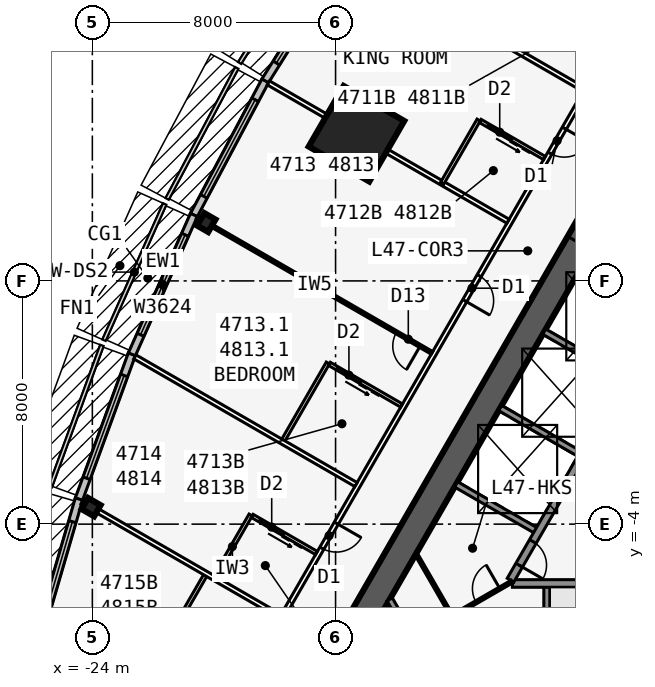
"""IFC4 building model, lengths in metres.
Left out: names, types, materials, properties, quantities, classifications, styles, units other than length and angle.
Written with IfcOpenShell. Run it as: python <this file> out.ifc"""

import sys

from ifc_helpers import new_model, si_unit, direction, frame, frame_2d, origin, origin_2d, place, context, subcontext, project, spatial, rectangle, i_section, extrude, element, fill, save


model = new_model("IFC4")
c1 = context("Model", 3, precision=1e-05, world=origin(), true_north=direction((0.0, 1.0)))
c2 = subcontext(c1, "Body", "Model", "MODEL_VIEW")
j1 = project(units=[si_unit("LENGTHUNIT", "METRE"), si_unit("PLANEANGLEUNIT", "RADIAN")], contexts=[c1])
p1 = place(None, origin())
s1 = spatial("IfcSite", under=j1, at=p1, CompositionType="ELEMENT")
p2 = place(p1, origin())
s2 = spatial("IfcBuilding", under=s1, at=p2, CompositionType="ELEMENT")
p3 = place(p2, frame((0.0, 0.0, 175.9)))
s3 = spatial("IfcBuildingStorey", under=s2, at=p3, CompositionType="ELEMENT", Elevation=175.9)
p4 = place(p3, frame((-10.183, -5.951, 0.0), z_axis=(0.0, 0.0, 1.0), x_axis=(1.0, 0.0, 0.0)))
e1 = element("IfcWall", 1, at=p4, inside=s3, PredefinedType="SOLIDWALL", context=c2, shape_type="SweptSolid", body=[
    extrude(rectangle(XDim=7.633, YDim=0.25, at=frame_2d((3.816, 0.0))), origin(), (0.0, 0.0, 1.0), 3.235),
])
p5 = place(p3, frame((-9.05, -5.951, 0.0), z_axis=(0.0, 0.0, 1.0), x_axis=(0.0, -1.0, 0.0)))
e2 = element("IfcWall", 2, at=p5, inside=s3, PredefinedType="SOLIDWALL", context=c2, shape_type="SweptSolid", body=[
    extrude(rectangle(XDim=3.125, YDim=0.2, at=frame_2d((1.562, 0.0))), origin(), (0.0, 0.0, 1.0), 3.235),
])
p6 = place(p3, frame((0.0, 19.052, 0.0), z_axis=(0.0, 0.0, 1.0), x_axis=(-0.499999749417, -0.866025548458, 0.0)))
e3 = element("IfcWall", 3, at=p6, inside=s3, PredefinedType="SHEAR", context=c2, shape_type="SweptSolid", body=[
    extrude(rectangle(XDim=33.0, YDim=0.9, at=frame_2d((16.5, 0.0))), origin(), (0.0, 0.0, 1.0), 3.4),
])
p7 = place(p6, frame((14.15, 0.0, 0.0)))
e4 = element("IfcOpeningElement", 4, at=p7, cuts=e3, PredefinedType="OPENING", context=c2, shape_type="SweptSolid", body=[
    extrude(rectangle(XDim=1.8, YDim=2.13, at=frame_2d((0.9, 1.065))), frame((0.0, 0.46, 0.0), z_axis=(0.0, -1.0, 0.0), x_axis=(1.0, 0.0, 0.0)), (0.0, 0.0, 1.0), 0.92),
])
p8 = place(p6, frame((12.6, 0.0, 0.0)))
e5 = element("IfcOpeningElement", 5, at=p8, cuts=e3, PredefinedType="OPENING", context=c2, shape_type="SweptSolid", body=[
    extrude(rectangle(XDim=1.0, YDim=2.13, at=frame_2d((0.5, 1.065))), frame((0.0, 0.46, 0.0), z_axis=(0.0, -1.0, 0.0), x_axis=(1.0, 0.0, 0.0)), (0.0, 0.0, 1.0), 0.92),
])
p9 = place(p3, frame((-4.929, 3.365, 0.0), z_axis=(0.0, 0.0, 1.0), x_axis=(-0.499991433582, -0.866030349552, 0.0)))
e6 = element("IfcWall", 6, at=p9, inside=s3, PredefinedType="SOLIDWALL", context=c2, shape_type="SweptSolid", body=[
    extrude(rectangle(XDim=10.633, YDim=0.25, at=frame_2d((5.316, 0.0))), origin(), (0.0, 0.0, 1.0), 3.235),
])
p10 = place(p9, frame((9.164, 0.0, 0.0)))
e7 = element("IfcOpeningElement", 7, at=p10, cuts=e6, PredefinedType="OPENING", context=c2, shape_type="SweptSolid", body=[
    extrude(rectangle(XDim=0.9, YDim=2.13, at=frame_2d((0.45, 1.065))), frame((0.0, 0.135, 0.0), z_axis=(0.0, -1.0, 0.0), x_axis=(1.0, 0.0, 0.0)), (0.0, 0.0, 1.0), 0.27),
])
for number, where, z_axis, x_axis in (
    (8, (-6.429, 0.767, 0.0), (0.0, 0.0, 1.0), (-0.866, 0.5, 0.0)),
    (9, (-7.879, -1.744, 0.0), (0.0, 0.0, 1.0), (-0.866, 0.5, 0.0)),
    (10, (-9.329, -4.256, 0.0), (0.0, 0.0, 1.0), (-0.866, 0.5, 0.0)),
):
    element("IfcWall", number, at=place(p3, frame(where, z_axis=z_axis, x_axis=x_axis)), inside=s3, PredefinedType="SOLIDWALL", context=c2, shape_type="SweptSolid", body=[
        extrude(rectangle(XDim=3.125, YDim=0.2, at=frame_2d((1.562, 0.0))), origin(), (0.0, 0.0, 1.0), 3.235),
    ])
for number, where, z_axis, x_axis in (
    (11, (-20.254, 5.92, 0.0), (0.0, 0.0, 1.0), (-0.866, 0.5, 0.0)),
    (12, (-24.041, -3.44, 0.0), (0.0, 0.0, 1.0), (-0.5, -0.866, 0.0)),
):
    element("IfcColumn", number, at=place(p3, frame(where, z_axis=z_axis, x_axis=x_axis)), inside=s3, PredefinedType="COLUMN", context=c2, shape_type="SweptSolid", body=[
        extrude(i_section(OverallWidth=0.424, OverallDepth=0.475, WebThickness=0.048, FlangeThickness=0.077, at=origin_2d()), origin(), (0.0, 0.0, 1.0), 3.4),
    ])
p11 = place(p3, frame((-15.312, 8.84, 0.0), z_axis=(0.0, 0.0, 1.0), x_axis=(-0.866025403784, 0.5, 0.0)))
e13 = element("IfcColumn", 13, at=p11, inside=s3, PredefinedType="COLUMN", context=c2, shape_type="SweptSolid", body=[
    extrude(rectangle(XDim=2.3, YDim=2.3, at=origin_2d()), origin(), (0.0, 0.0, 1.0), 3.4),
])
p12 = place(p3, frame((-15.667, 14.814, 0.0), z_axis=(0.0, 0.0, 1.0), x_axis=(-0.529990167382, -0.84800378683, 0.0)))
e14 = element("IfcWall", 14, at=p12, inside=s3, PredefinedType="STANDARD", context=c2, shape_type="SweptSolid", body=[
    extrude(rectangle(XDim=5.003, YDim=0.25, at=frame_2d((2.501, 0.0))), origin(), (0.0, 0.0, 1.0), 3.235),
])
p13 = place(p12, frame((0.701, 0.0, 0.45)))
e15 = element("IfcOpeningElement", 15, at=p13, cuts=e14, PredefinedType="OPENING", context=c2, shape_type="SweptSolid", body=[
    extrude(rectangle(XDim=3.6, YDim=2.4, at=frame_2d((1.8, 1.2))), frame((0.0, 0.135, 0.0), z_axis=(0.0, -1.0, 0.0), x_axis=(1.0, 0.0, 0.0)), (0.0, 0.0, 1.0), 0.27),
])
p14 = place(p3, frame((-18.314, 10.579, 0.0), z_axis=(0.0, 0.0, 1.0), x_axis=(-0.469404966864, -0.882982999317, 0.0)))
e16 = element("IfcWall", 16, at=p14, inside=s3, PredefinedType="STANDARD", context=c2, shape_type="SweptSolid", body=[
    extrude(rectangle(XDim=5.003, YDim=0.25, at=frame_2d((2.501, 0.0))), origin(), (0.0, 0.0, 1.0), 3.235),
])
p15 = place(p14, frame((0.701, 0.0, 0.45)))
e17 = element("IfcOpeningElement", 17, at=p15, cuts=e16, PredefinedType="OPENING", context=c2, shape_type="SweptSolid", body=[
    extrude(rectangle(XDim=3.6, YDim=2.4, at=frame_2d((1.8, 1.2))), frame((0.0, 0.135, 0.0), z_axis=(0.0, -1.0, 0.0), x_axis=(1.0, 0.0, 0.0)), (0.0, 0.0, 1.0), 0.27),
])
p16 = place(p3, frame((-20.659, 6.169, 0.0), z_axis=(0.0, 0.0, 1.0), x_axis=(-0.406832200364, -0.913502906808, 0.0)))
e18 = element("IfcWall", 18, at=p16, inside=s3, PredefinedType="STANDARD", context=c2, shape_type="SweptSolid", body=[
    extrude(rectangle(XDim=5.028, YDim=0.25, at=frame_2d((2.514, 0.0))), origin(), (0.0, 0.0, 1.0), 3.235),
])
p17 = place(p16, frame((0.714, 0.0, 0.45)))
e19 = element("IfcOpeningElement", 19, at=p17, cuts=e18, PredefinedType="OPENING", context=c2, shape_type="SweptSolid", body=[
    extrude(rectangle(XDim=3.6, YDim=2.4, at=frame_2d((1.8, 1.2))), frame((0.0, 0.135, 0.0), z_axis=(0.0, -1.0, 0.0), x_axis=(1.0, 0.0, 0.0)), (0.0, 0.0, 1.0), 0.27),
])
p18 = place(p3, frame((-22.701, 1.584, 0.0), z_axis=(0.0, 0.0, 1.0), x_axis=(-0.343225593282, -0.939252996863, 0.0)))
e20 = element("IfcWall", 20, at=p18, inside=s3, PredefinedType="STANDARD", context=c2, shape_type="SweptSolid", body=[
    extrude(rectangle(XDim=5.076, YDim=0.25, at=frame_2d((2.538, 0.0))), origin(), (0.0, 0.0, 1.0), 3.235),
])
p19 = place(p18, frame((0.738, 0.0, 0.45)))
e21 = element("IfcOpeningElement", 21, at=p19, cuts=e20, PredefinedType="OPENING", context=c2, shape_type="SweptSolid", body=[
    extrude(rectangle(XDim=3.6, YDim=2.4, at=frame_2d((1.8, 1.2))), frame((0.0, 0.135, 0.0), z_axis=(0.0, -1.0, 0.0), x_axis=(1.0, 0.0, 0.0)), (0.0, 0.0, 1.0), 0.27),
])
p20 = place(p3, frame((-24.441, -3.175, 0.0), z_axis=(0.0, 0.0, 1.0), x_axis=(-0.279528287117, -0.960137457191, 0.0)))
e22 = element("IfcWall", 22, at=p20, inside=s3, PredefinedType="STANDARD", context=c2, shape_type="SweptSolid", body=[
    extrude(rectangle(XDim=5.148, YDim=0.25, at=frame_2d((2.574, 0.0))), origin(), (0.0, 0.0, 1.0), 3.235),
])
p21 = place(p20, frame((0.774, 0.0, 0.45)))
e23 = element("IfcOpeningElement", 23, at=p21, cuts=e22, PredefinedType="OPENING", context=c2, shape_type="SweptSolid", body=[
    extrude(rectangle(XDim=3.6, YDim=2.4, at=frame_2d((1.8, 1.2))), frame((0.0, 0.135, 0.0), z_axis=(0.0, -1.0, 0.0), x_axis=(1.0, 0.0, 0.0)), (0.0, 0.0, 1.0), 0.27),
])
p22 = place(p3, frame((-0.5, 22.836, 0.0), z_axis=(0.0, 0.0, 1.0), x_axis=(-0.500001677587, -0.866024435227, 0.0)))
e24 = element("IfcWall", 24, at=p22, inside=s3, PredefinedType="PARTITIONING", context=c2, shape_type="SweptSolid", body=[
    extrude(rectangle(XDim=39.054, YDim=0.15, at=frame_2d((19.527, 0.0))), origin(), (0.0, 0.0, 1.0), 3.235),
])
p23 = place(p22, frame((0.352, 0.0, 0.0)))
e25 = element("IfcOpeningElement", 25, at=p23, cuts=e24, PredefinedType="OPENING", context=c2, shape_type="SweptSolid", body=[
    extrude(rectangle(XDim=0.95, YDim=2.13, at=frame_2d((0.475, 1.065))), frame((0.0, 0.085, 0.0), z_axis=(0.0, -1.0, 0.0), x_axis=(1.0, 0.0, 0.0)), (0.0, 0.0, 1.0), 0.17),
])
p24 = place(p22, frame((6.552, 0.0, 0.0)))
e26 = element("IfcOpeningElement", 26, at=p24, cuts=e24, PredefinedType="OPENING", context=c2, shape_type="SweptSolid", body=[
    extrude(rectangle(XDim=0.95, YDim=2.13, at=frame_2d((0.475, 1.065))), frame((0.0, 0.085, 0.0), z_axis=(0.0, -1.0, 0.0), x_axis=(1.0, 0.0, 0.0)), (0.0, 0.0, 1.0), 0.17),
])
p25 = place(p22, frame((15.952, 0.0, 0.0)))
e27 = element("IfcOpeningElement", 27, at=p25, cuts=e24, PredefinedType="OPENING", context=c2, shape_type="SweptSolid", body=[
    extrude(rectangle(XDim=0.95, YDim=2.13, at=frame_2d((0.475, 1.065))), frame((0.0, 0.085, 0.0), z_axis=(0.0, -1.0, 0.0), x_axis=(1.0, 0.0, 0.0)), (0.0, 0.0, 1.0), 0.17),
])
p26 = place(p22, frame((21.552, 0.0, 0.0)))
e28 = element("IfcOpeningElement", 28, at=p26, cuts=e24, PredefinedType="OPENING", context=c2, shape_type="SweptSolid", body=[
    extrude(rectangle(XDim=0.95, YDim=2.13, at=frame_2d((0.475, 1.065))), frame((0.0, 0.085, 0.0), z_axis=(0.0, -1.0, 0.0), x_axis=(1.0, 0.0, 0.0)), (0.0, 0.0, 1.0), 0.17),
])
p27 = place(p22, frame((30.952, 0.0, 0.0)))
e29 = element("IfcOpeningElement", 29, at=p27, cuts=e24, PredefinedType="OPENING", context=c2, shape_type="SweptSolid", body=[
    extrude(rectangle(XDim=0.95, YDim=2.13, at=frame_2d((0.475, 1.065))), frame((0.0, 0.085, 0.0), z_axis=(0.0, -1.0, 0.0), x_axis=(1.0, 0.0, 0.0)), (0.0, 0.0, 1.0), 0.17),
])
p28 = place(p22, frame((37.752, 0.0, 0.0)))
e30 = element("IfcOpeningElement", 30, at=p28, cuts=e24, PredefinedType="OPENING", context=c2, shape_type="SweptSolid", body=[
    extrude(rectangle(XDim=0.95, YDim=2.13, at=frame_2d((0.475, 1.065))), frame((0.0, 0.085, 0.0), z_axis=(0.0, -1.0, 0.0), x_axis=(1.0, 0.0, 0.0)), (0.0, 0.0, 1.0), 0.17),
])
p29 = place(p3, frame((-7.829, 10.293, 0.0), z_axis=(0.0, 0.0, 1.0), x_axis=(-0.866027015393, 0.499997208602, 0.0)))
e31 = element("IfcWall", 31, at=p29, inside=s3, PredefinedType="PARTITIONING", context=c2, shape_type="SweptSolid", body=[
    extrude(rectangle(XDim=8.922, YDim=0.15, at=frame_2d((4.461, 0.0))), origin(), (0.0, 0.0, 1.0), 2.389),
])
p30 = place(p3, frame((-10.329, 5.963, 0.0), z_axis=(0.0, 0.0, 1.0), x_axis=(-0.866025170687, 0.500000403736, 0.0)))
e32 = element("IfcWall", 32, at=p30, inside=s3, PredefinedType="PARTITIONING", context=c2, shape_type="SweptSolid", body=[
    extrude(rectangle(XDim=9.099, YDim=0.15, at=frame_2d((4.549, 0.0))), origin(), (0.0, 0.0, 1.0), 2.389),
])
p31 = place(p3, frame((-12.829, 1.633, 0.0), z_axis=(0.0, 0.0, 1.0), x_axis=(-0.866027015393, 0.499997208602, 0.0)))
e33 = element("IfcWall", 33, at=p31, inside=s3, PredefinedType="PARTITIONING", context=c2, shape_type="SweptSolid", body=[
    extrude(rectangle(XDim=8.922, YDim=0.1, at=frame_2d((4.461, 0.0))), origin(), (0.0, 0.0, 1.0), 2.389),
])
p32 = place(p31, frame((0.45, 0.0, 0.0)))
e34 = element("IfcOpeningElement", 34, at=p32, cuts=e33, PredefinedType="OPENING", context=c2, shape_type="SweptSolid", body=[
    extrude(rectangle(XDim=0.9, YDim=2.13, at=frame_2d((0.45, 1.065))), frame((0.0, 0.06, 0.0), z_axis=(0.0, -1.0, 0.0), x_axis=(1.0, 0.0, 0.0)), (0.0, 0.0, 1.0), 0.12),
])
p33 = place(p3, frame((-15.329, -2.697, 0.0), z_axis=(0.0, 0.0, 1.0), x_axis=(-0.866024316602, 0.50000188305, 0.0)))
e35 = element("IfcWall", 35, at=p33, inside=s3, PredefinedType="PARTITIONING", context=c2, shape_type="SweptSolid", body=[
    extrude(rectangle(XDim=8.395, YDim=0.15, at=frame_2d((4.198, 0.0))), origin(), (0.0, 0.0, 1.0), 2.389),
])
p34 = place(p3, frame((-17.829, -7.027, 0.0), z_axis=(0.0, 0.0, 1.0), x_axis=(-0.866029804378, 0.499992377871, 0.0)))
e36 = element("IfcWall", 36, at=p34, inside=s3, PredefinedType="PARTITIONING", context=c2, shape_type="SweptSolid", body=[
    extrude(rectangle(XDim=7.516, YDim=0.15, at=frame_2d((3.758, 0.0))), origin(), (0.0, 0.0, 1.0), 2.389),
])
p35 = place(p3, frame((-11.293, 9.292, 0.0), z_axis=(0.0, 0.0, 1.0), x_axis=(-0.500001309137, -0.866024647952, 0.0)))
e37 = element("IfcWall", 37, at=p35, inside=s3, PredefinedType="PLUMBINGWALL", context=c2, shape_type="SweptSolid", body=[
    extrude(rectangle(XDim=2.4, YDim=0.12, at=frame_2d((1.2, 0.0))), origin(), (0.0, 0.0, 1.0), 3.235),
])
p36 = place(p3, frame((-9.128, 8.042, 0.0), z_axis=(0.0, 0.0, 1.0), x_axis=(-0.866005645448, 0.500034220881, 0.0)))
e38 = element("IfcWall", 38, at=p36, inside=s3, PredefinedType="PLUMBINGWALL", context=c2, shape_type="SweptSolid", body=[
    extrude(rectangle(XDim=2.44, YDim=0.12, at=frame_2d((1.22, 0.0))), origin(), (0.0, 0.0, 1.0), 3.235),
])
p37 = place(p36, frame((1.25, 0.0, 0.0)))
e39 = element("IfcOpeningElement", 39, at=p37, cuts=e38, PredefinedType="OPENING", context=c2, shape_type="SweptSolid", body=[
    extrude(rectangle(XDim=0.9, YDim=2.13, at=frame_2d((0.45, 1.065))), frame((0.0, 0.07, 0.0), z_axis=(0.0, -1.0, 0.0), x_axis=(1.0, 0.0, 0.0)), (0.0, 0.0, 1.0), 0.14),
])
p38 = place(p3, frame((-16.253, 1.301, 0.0), z_axis=(0.0, 0.0, 1.0), x_axis=(-0.499990139034, -0.866031096941, 0.0)))
e40 = element("IfcWall", 40, at=p38, inside=s3, PredefinedType="PLUMBINGWALL", context=c2, shape_type="SweptSolid", body=[
    extrude(rectangle(XDim=3.0, YDim=0.12, at=frame_2d((1.5, 0.0))), origin(), (0.0, 0.0, 1.0), 3.235),
])
p39 = place(p3, frame((-13.829, -0.099, 0.0), z_axis=(0.0, 0.0, 1.0), x_axis=(-0.865997131366, 0.500048966069, 0.0)))
e41 = element("IfcWall", 41, at=p39, inside=s3, PredefinedType="PLUMBINGWALL", context=c2, shape_type="SweptSolid", body=[
    extrude(rectangle(XDim=2.74, YDim=0.12, at=frame_2d((1.37, 0.0))), origin(), (0.0, 0.0, 1.0), 3.235),
])
p40 = place(p39, frame((1.55, 0.0, 0.0)))
e42 = element("IfcOpeningElement", 42, at=p40, cuts=e41, PredefinedType="OPENING", context=c2, shape_type="SweptSolid", body=[
    extrude(rectangle(XDim=0.9, YDim=2.13, at=frame_2d((0.45, 1.065))), frame((0.0, 0.07, 0.0), z_axis=(0.0, -1.0, 0.0), x_axis=(1.0, 0.0, 0.0)), (0.0, 0.0, 1.0), 0.14),
])
p41 = place(p3, frame((-18.793, -3.699, 0.0), z_axis=(0.0, 0.0, 1.0), x_axis=(-0.500001309137, -0.866024647952, 0.0)))
e43 = element("IfcWall", 43, at=p41, inside=s3, PredefinedType="PLUMBINGWALL", context=c2, shape_type="SweptSolid", body=[
    extrude(rectangle(XDim=2.4, YDim=0.12, at=frame_2d((1.2, 0.0))), origin(), (0.0, 0.0, 1.0), 3.235),
])
p42 = place(p3, frame((-16.628, -4.949, 0.0), z_axis=(0.0, 0.0, 1.0), x_axis=(-0.866048967903, 0.499959183527, 0.0)))
e44 = element("IfcWall", 44, at=p42, inside=s3, PredefinedType="PLUMBINGWALL", context=c2, shape_type="SweptSolid", body=[
    extrude(rectangle(XDim=2.44, YDim=0.12, at=frame_2d((1.22, 0.0))), origin(), (0.0, 0.0, 1.0), 3.235),
])
p43 = place(p42, frame((1.25, 0.0, 0.0)))
e45 = element("IfcOpeningElement", 45, at=p43, cuts=e44, PredefinedType="OPENING", context=c2, shape_type="SweptSolid", body=[
    extrude(rectangle(XDim=0.9, YDim=2.13, at=frame_2d((0.45, 1.065))), frame((0.0, 0.07, 0.0), z_axis=(0.0, -1.0, 0.0), x_axis=(1.0, 0.0, 0.0)), (0.0, 0.0, 1.0), 0.14),
])
p44 = place(p3, frame((-20.253, -5.627, 0.0), z_axis=(0.0, 0.0, 1.0), x_axis=(-0.499990139034, -0.866031096941, 0.0)))
e46 = element("IfcWall", 46, at=p44, inside=s3, PredefinedType="PLUMBINGWALL", context=c2, shape_type="SweptSolid", body=[
    extrude(rectangle(XDim=3.0, YDim=0.12, at=frame_2d((1.5, 0.0))), origin(), (0.0, 0.0, 1.0), 3.235),
])
p45 = place(p3, frame((-12.719, -9.076, 0.0), z_axis=(0.0, 0.0, 1.0), x_axis=(-0.499952404951, 0.866052881055, 0.0)))
e47 = element("IfcWall", 47, at=p45, inside=s3, PredefinedType="SOLIDWALL", context=c2, shape_type="SweptSolid", body=[
    extrude(rectangle(XDim=3.002, YDim=0.2, at=frame_2d((1.501, 0.0))), origin(), (0.0, 0.0, 1.0), 3.235),
])
p46 = place(p3, frame((-10.986, -9.076, 0.0), z_axis=(0.0, 0.0, 1.0), x_axis=(-0.499999210213, 0.866025859768, 0.0)))
e48 = element("IfcWall", 48, at=p46, inside=s3, PredefinedType="PARTITIONING", context=c2, shape_type="SweptSolid", body=[
    extrude(rectangle(XDim=4.734, YDim=0.1, at=frame_2d((2.367, 0.0))), origin(), (0.0, 0.0, 1.0), 3.235),
])
p47 = place(p46, frame((0.734, 0.0, 0.0)))
e49 = element("IfcOpeningElement", 49, at=p47, cuts=e48, PredefinedType="OPENING", context=c2, shape_type="SweptSolid", body=[
    extrude(rectangle(XDim=0.9, YDim=2.13, at=frame_2d((0.45, 1.065))), frame((0.0, 0.06, 0.0), z_axis=(0.0, -1.0, 0.0), x_axis=(1.0, 0.0, 0.0)), (0.0, 0.0, 1.0), 0.12),
])
p48 = place(p3, frame((-12.17, -7.026, 0.0), z_axis=(0.0, 0.0, 1.0), x_axis=(0.866015833478, 0.50001657589, 0.0)))
e50 = element("IfcWall", 50, at=p48, inside=s3, PredefinedType="PARTITIONING", context=c2, shape_type="SweptSolid", body=[
    extrude(rectangle(XDim=2.275, YDim=0.1, at=frame_2d((1.138, 0.0))), origin(), (0.0, 0.0, 1.0), 3.235),
])
p49 = place(p48, frame((0.915, 0.0, 0.0)))
e51 = element("IfcOpeningElement", 51, at=p49, cuts=e50, PredefinedType="OPENING", context=c2, shape_type="SweptSolid", body=[
    extrude(rectangle(XDim=0.9, YDim=2.13, at=frame_2d((0.45, 1.065))), frame((0.0, 0.06, 0.0), z_axis=(0.0, -1.0, 0.0), x_axis=(1.0, 0.0, 0.0)), (0.0, 0.0, 1.0), 0.12),
])
p50 = place(p13, origin())
e52 = element("IfcWindow", 52, at=p50, inside=s3, PartitioningType="SINGLE_PANEL", PredefinedType="WINDOW", context=c2, shape_type="SweptSolid", body=[
    extrude(rectangle(XDim=3.6, YDim=2.4, at=frame_2d((1.8, 1.2))), frame((0.0, 0.03, 0.0), z_axis=(0.0, -1.0, 0.0), x_axis=(1.0, 0.0, 0.0)), (0.0, 0.0, 1.0), 0.06),
])
fill(e15, e52)
p51 = place(p15, origin())
e53 = element("IfcWindow", 53, at=p51, inside=s3, PartitioningType="SINGLE_PANEL", PredefinedType="WINDOW", context=c2, shape_type="SweptSolid", body=[
    extrude(rectangle(XDim=3.6, YDim=2.4, at=frame_2d((1.8, 1.2))), frame((0.0, 0.03, 0.0), z_axis=(0.0, -1.0, 0.0), x_axis=(1.0, 0.0, 0.0)), (0.0, 0.0, 1.0), 0.06),
])
fill(e17, e53)
p52 = place(p17, origin())
e54 = element("IfcWindow", 54, at=p52, inside=s3, PartitioningType="SINGLE_PANEL", PredefinedType="WINDOW", context=c2, shape_type="SweptSolid", body=[
    extrude(rectangle(XDim=3.6, YDim=2.4, at=frame_2d((1.8, 1.2))), frame((0.0, 0.03, 0.0), z_axis=(0.0, -1.0, 0.0), x_axis=(1.0, 0.0, 0.0)), (0.0, 0.0, 1.0), 0.06),
])
fill(e19, e54)
p53 = place(p19, origin())
e55 = element("IfcWindow", 55, at=p53, inside=s3, PartitioningType="SINGLE_PANEL", PredefinedType="WINDOW", context=c2, shape_type="SweptSolid", body=[
    extrude(rectangle(XDim=3.6, YDim=2.4, at=frame_2d((1.8, 1.2))), frame((0.0, 0.03, 0.0), z_axis=(0.0, -1.0, 0.0), x_axis=(1.0, 0.0, 0.0)), (0.0, 0.0, 1.0), 0.06),
])
fill(e21, e55)
p54 = place(p21, origin())
e56 = element("IfcWindow", 56, at=p54, inside=s3, PartitioningType="SINGLE_PANEL", PredefinedType="WINDOW", context=c2, shape_type="SweptSolid", body=[
    extrude(rectangle(XDim=3.6, YDim=2.4, at=frame_2d((1.8, 1.2))), frame((0.0, 0.03, 0.0), z_axis=(0.0, -1.0, 0.0), x_axis=(1.0, 0.0, 0.0)), (0.0, 0.0, 1.0), 0.06),
])
fill(e23, e56)
p55 = place(p32, origin())
e57 = element("IfcDoor", 57, at=p55, inside=s3, OperationType="SINGLE_SWING_LEFT", PredefinedType="DOOR", context=c2, shape_type="SweptSolid", body=[
    extrude(rectangle(XDim=0.9, YDim=2.13, at=frame_2d((0.45, 1.065))), frame((0.0, 0.025, 0.0), z_axis=(0.0, -1.0, 0.0), x_axis=(1.0, 0.0, 0.0)), (0.0, 0.0, 1.0), 0.05),
])
fill(e34, e57)
p56 = place(p37, origin())
e58 = element("IfcDoor", 58, at=p56, inside=s3, OperationType="SLIDING_TO_LEFT", PredefinedType="DOOR", context=c2, shape_type="SweptSolid", body=[
    extrude(rectangle(XDim=0.9, YDim=2.13, at=frame_2d((0.45, 1.065))), frame((0.0, 0.025, 0.0), z_axis=(0.0, -1.0, 0.0), x_axis=(1.0, 0.0, 0.0)), (0.0, 0.0, 1.0), 0.05),
])
fill(e39, e58)
p57 = place(p25, origin())
e59 = element("IfcDoor", 59, at=p57, inside=s3, OperationType="SINGLE_SWING_LEFT", PredefinedType="DOOR", context=c2, shape_type="SweptSolid", body=[
    extrude(rectangle(XDim=0.95, YDim=2.13, at=frame_2d((0.475, 1.065))), frame((0.0, 0.025, 0.0), z_axis=(0.0, -1.0, 0.0), x_axis=(1.0, 0.0, 0.0)), (0.0, 0.0, 1.0), 0.05),
])
fill(e27, e59)
p58 = place(p26, origin())
e60 = element("IfcDoor", 60, at=p58, inside=s3, OperationType="SINGLE_SWING_RIGHT", PredefinedType="DOOR", context=c2, shape_type="SweptSolid", body=[
    extrude(rectangle(XDim=0.95, YDim=2.13, at=frame_2d((0.475, 1.065))), frame((0.0, 0.025, 0.0), z_axis=(0.0, -1.0, 0.0), x_axis=(1.0, 0.0, 0.0)), (0.0, 0.0, 1.0), 0.05),
])
fill(e28, e60)
p59 = place(p40, origin())
e61 = element("IfcDoor", 61, at=p59, inside=s3, OperationType="SLIDING_TO_LEFT", PredefinedType="DOOR", context=c2, shape_type="SweptSolid", body=[
    extrude(rectangle(XDim=0.9, YDim=2.13, at=frame_2d((0.45, 1.065))), frame((0.0, 0.025, 0.0), z_axis=(0.0, -1.0, 0.0), x_axis=(1.0, 0.0, 0.0)), (0.0, 0.0, 1.0), 0.05),
])
fill(e42, e61)
p60 = place(p43, origin())
e62 = element("IfcDoor", 62, at=p60, inside=s3, OperationType="SLIDING_TO_LEFT", PredefinedType="DOOR", context=c2, shape_type="SweptSolid", body=[
    extrude(rectangle(XDim=0.9, YDim=2.13, at=frame_2d((0.45, 1.065))), frame((0.0, 0.025, 0.0), z_axis=(0.0, -1.0, 0.0), x_axis=(1.0, 0.0, 0.0)), (0.0, 0.0, 1.0), 0.05),
])
fill(e45, e62)
p61 = place(p27, origin())
e63 = element("IfcDoor", 63, at=p61, inside=s3, OperationType="SINGLE_SWING_LEFT", PredefinedType="DOOR", context=c2, shape_type="SweptSolid", body=[
    extrude(rectangle(XDim=0.95, YDim=2.13, at=frame_2d((0.475, 1.065))), frame((0.0, 0.025, 0.0), z_axis=(0.0, -1.0, 0.0), x_axis=(1.0, 0.0, 0.0)), (0.0, 0.0, 1.0), 0.05),
])
fill(e29, e63)
p62 = place(p10, origin())
e64 = element("IfcDoor", 64, at=p62, inside=s3, OperationType="SINGLE_SWING_RIGHT", PredefinedType="DOOR", context=c2, shape_type="SweptSolid", body=[
    extrude(rectangle(XDim=0.9, YDim=2.13, at=frame_2d((0.45, 1.065))), frame((0.0, 0.025, 0.0), z_axis=(0.0, -1.0, 0.0), x_axis=(1.0, 0.0, 0.0)), (0.0, 0.0, 1.0), 0.05),
])
fill(e7, e64)
p63 = place(p49, origin())
e65 = element("IfcDoor", 65, at=p63, inside=s3, OperationType="SINGLE_SWING_RIGHT", PredefinedType="DOOR", context=c2, shape_type="SweptSolid", body=[
    extrude(rectangle(XDim=0.9, YDim=2.13, at=frame_2d((0.45, 1.065))), frame((0.0, 0.025, 0.0), z_axis=(0.0, -1.0, 0.0), x_axis=(1.0, 0.0, 0.0)), (0.0, 0.0, 1.0), 0.05),
])
fill(e51, e65)
save(model, sys.argv[1])
